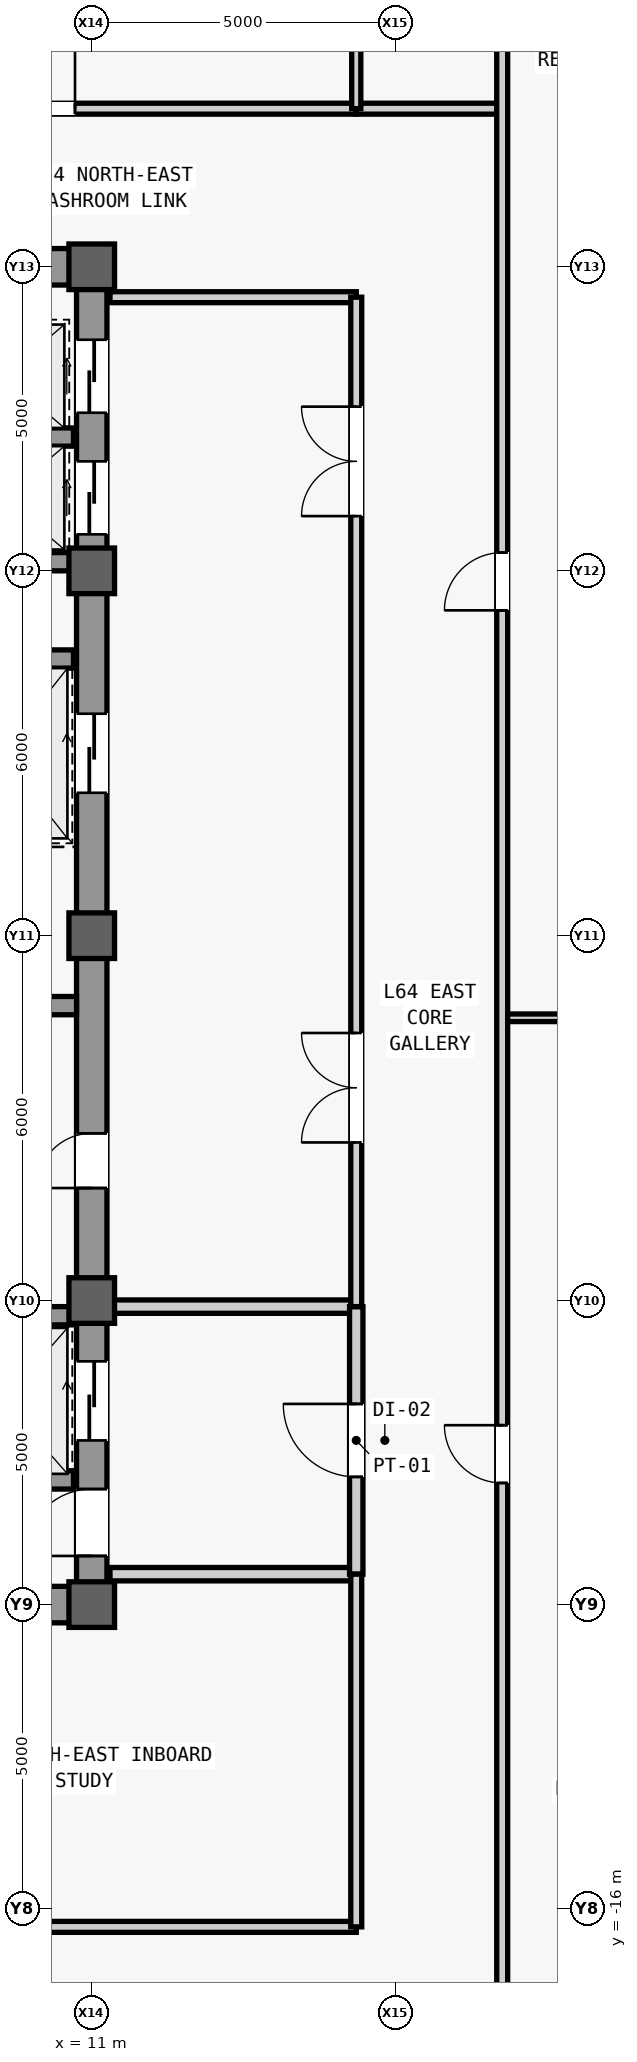
"""IFC4 building model, lengths in metres.
Left out: names, types, materials, properties, quantities, classifications, styles, units other than length and angle.
Written with IfcOpenShell. Run it as: python <this file> out.ifc"""

import sys

from ifc_helpers import new_model, si_unit, direction, frame, frame_2d, origin, origin_2d, place, context, subcontext, project, spatial, rectangle, extrude, source, transform, mapped, element, fill, save


model = new_model("IFC4")
c1 = context("Model", 3, precision=1e-05, world=origin(), true_north=direction((0.0, 1.0)))
c2 = subcontext(c1, "Body", "Model", "MODEL_VIEW")
j1 = project(units=[si_unit("LENGTHUNIT", "METRE"), si_unit("PLANEANGLEUNIT", "RADIAN")], contexts=[c1])
p1 = place(None, origin())
s1 = spatial("IfcSite", under=j1, at=p1, CompositionType="ELEMENT")
p2 = place(p1, origin())
s2 = spatial("IfcBuilding", under=s1, at=p2, CompositionType="ELEMENT")
p3 = place(p2, frame((0.0, 0.0, 273.5)))
s3 = spatial("IfcBuildingStorey", under=s2, at=p3, CompositionType="ELEMENT", Elevation=273.5)
m1 = source(origin(), c2, "Body", "SweptSolid", [
    extrude(rectangle(XDim=22.0, YDim=0.5, at=frame_2d((11.0, 0.0))), origin(), (0.0, 0.0, 1.0), 3.78),
])
p4 = place(p3, frame((11.0, -11.0, 0.0), z_axis=(0.0, 0.0, 1.0), x_axis=(0.0, 1.0, 0.0)))
e1 = element("IfcWall", 1, at=p4, inside=s3, PredefinedType="SHEAR", context=c2, shape_type="MappedRepresentation", body=[
    mapped(m1, transform((0.0, 0.0, 0.0), scale=1.0)),
])
m2 = source(origin(), c2, "Body", "SweptSolid", [
    extrude(rectangle(XDim=1.1, YDim=2.2, at=frame_2d((0.55, 1.1))), frame((0.0, 0.26, 0.0), z_axis=(0.0, -1.0, 0.0), x_axis=(1.0, 0.0, 0.0)), (0.0, 0.0, 1.0), 0.52),
])
p5 = place(p4, frame((0.8, 0.0, 0.0)))
e2 = element("IfcOpeningElement", 2, at=p5, cuts=e1, PredefinedType="OPENING", context=c2, shape_type="MappedRepresentation", body=[
    mapped(m2, transform((0.0, 0.0, 0.0), scale=1.0)),
])
m3 = source(origin(), c2, "Body", "SweptSolid", [
    extrude(rectangle(XDim=0.9, YDim=2.15, at=frame_2d((0.45, 1.075))), frame((0.0, 0.26, 0.0), z_axis=(0.0, -1.0, 0.0), x_axis=(1.0, 0.0, 0.0)), (0.0, 0.0, 1.0), 0.52),
])
p6 = place(p4, frame((6.85, 0.0, 0.0)))
e3 = element("IfcOpeningElement", 3, at=p6, cuts=e1, PredefinedType="OPENING", context=c2, shape_type="MappedRepresentation", body=[
    mapped(m3, transform((0.0, 0.0, 0.0), scale=1.0)),
])
m4 = source(origin(), c2, "Body", "SweptSolid", [
    extrude(rectangle(XDim=1.2, YDim=2.3, at=frame_2d((0.6, 1.15))), frame((0.0, 0.26, 0.0), z_axis=(0.0, -1.0, 0.0), x_axis=(1.0, 0.0, 0.0)), (0.0, 0.0, 1.0), 0.52),
])
p7 = place(p4, frame((17.6, 0.0, 0.0)))
e4 = element("IfcOpeningElement", 4, at=p7, cuts=e1, PredefinedType="OPENING", context=c2, shape_type="MappedRepresentation", body=[
    mapped(m4, transform((0.0, 0.0, 0.0), scale=1.0)),
])
p8 = place(p4, frame((19.6, 0.0, 0.0)))
e5 = element("IfcOpeningElement", 5, at=p8, cuts=e1, PredefinedType="OPENING", context=c2, shape_type="MappedRepresentation", body=[
    mapped(m4, transform((0.0, 0.0, 0.0), scale=1.0)),
])
m5 = source(origin(), c2, "Body", "SweptSolid", [
    extrude(rectangle(XDim=1.3, YDim=2.3, at=frame_2d((0.65, 1.15))), frame((0.0, 0.26, 0.0), z_axis=(0.0, -1.0, 0.0), x_axis=(1.0, 0.0, 0.0)), (0.0, 0.0, 1.0), 0.52),
])
p9 = place(p4, frame((2.7, 0.0, 0.0)))
e6 = element("IfcOpeningElement", 6, at=p9, cuts=e1, PredefinedType="OPENING", context=c2, shape_type="MappedRepresentation", body=[
    mapped(m5, transform((0.0, 0.0, 0.0), scale=1.0)),
])
p10 = place(p4, frame((13.35, 0.0, 0.0)))
e7 = element("IfcOpeningElement", 7, at=p10, cuts=e1, PredefinedType="OPENING", context=c2, shape_type="MappedRepresentation", body=[
    mapped(m5, transform((0.0, 0.0, 0.0), scale=1.0)),
])
m6 = source(origin(), c2, "Body", "SweptSolid", [
    extrude(rectangle(XDim=5.9, YDim=0.6, at=frame_2d((2.95, 0.0))), origin(), (0.0, 0.0, 1.0), 3.78),
])
p11 = place(p3, frame((4.85, -11.0, 0.0), z_axis=(0.0, 0.0, 1.0), x_axis=(1.0, 0.0, 0.0)))
e8 = element("IfcWall", 8, at=p11, inside=s3, PredefinedType="SHEAR", context=c2, shape_type="MappedRepresentation", body=[
    mapped(m6, transform((0.0, 0.0, 0.0), scale=1.0)),
])
p12 = place(p3, frame((4.85, 11.0, 0.0), z_axis=(0.0, 0.0, 1.0), x_axis=(1.0, 0.0, 0.0)))
e9 = element("IfcWall", 9, at=p12, inside=s3, PredefinedType="SHEAR", context=c2, shape_type="MappedRepresentation", body=[
    mapped(m6, transform((0.0, 0.0, 0.0), scale=1.0)),
])
m7 = source(origin(), c2, "Body", "SweptSolid", [
    extrude(rectangle(XDim=1.05, YDim=2.2, at=frame_2d((0.525, 1.1))), frame((0.0, 0.31, 0.0), z_axis=(0.0, -1.0, 0.0), x_axis=(1.0, 0.0, 0.0)), (0.0, 0.0, 1.0), 0.62),
])
p13 = place(p12, frame((1.375, 0.0, 0.0)))
e10 = element("IfcOpeningElement", 10, at=p13, cuts=e9, PredefinedType="OPENING", context=c2, shape_type="MappedRepresentation", body=[
    mapped(m7, transform((0.0, 0.0, 0.0), scale=1.0)),
])
m8 = source(origin(), c2, "Body", "SweptSolid", [
    extrude(rectangle(XDim=5.65, YDim=0.3, at=frame_2d((2.825, 0.0))), origin(), (0.0, 0.0, 1.0), 3.78),
])
p14 = place(p3, frame((5.1, -1.15, 0.0), z_axis=(0.0, 0.0, 1.0), x_axis=(1.0, 0.0, 0.0)))
e11 = element("IfcWall", 11, at=p14, inside=s3, PredefinedType="SHEAR", context=c2, shape_type="MappedRepresentation", body=[
    mapped(m8, transform((0.0, 0.0, 0.0), scale=1.0)),
])
m9 = source(origin(), c2, "Body", "SweptSolid", [
    extrude(rectangle(XDim=0.75, YDim=0.75, at=origin_2d()), origin(), (0.0, 0.0, 1.0), 4.0),
])
for number, where, z_axis, x_axis in (
    (12, (11.0, -11.0, 0.0), (0.0, 0.0, 1.0), (1.0, 0.0, 0.0)),
    (13, (11.0, -6.0, 0.0), (0.0, 0.0, 1.0), (1.0, 0.0, 0.0)),
    (14, (11.0, 0.0, 0.0), (0.0, 0.0, 1.0), (1.0, 0.0, 0.0)),
    (15, (11.0, 6.0, 0.0), (0.0, 0.0, 1.0), (1.0, 0.0, 0.0)),
    (16, (11.0, 11.0, 0.0), (0.0, 0.0, 1.0), (1.0, 0.0, 0.0)),
):
    element("IfcColumn", number, at=place(p3, frame(where, z_axis=z_axis, x_axis=x_axis)), inside=s3, PredefinedType="COLUMN", context=c2, shape_type="MappedRepresentation", body=[
        mapped(m9, transform((0.0, 0.0, 0.0), scale=1.0)),
    ])
m10 = source(origin(), c2, "Body", "SweptSolid", [
    extrude(rectangle(XDim=2.2, YDim=0.3, at=frame_2d((1.1, 0.0))), origin(), (0.0, 0.0, 1.0), 3.78),
])
for number, where, z_axis, x_axis in (
    (17, (8.5, -8.95, 0.0), (0.0, 0.0, 1.0), (1.0, 0.0, 0.0)),
    (18, (8.5, -6.25, 0.0), (0.0, 0.0, 1.0), (1.0, 0.0, 0.0)),
):
    element("IfcWall", number, at=place(p3, frame(where, z_axis=z_axis, x_axis=x_axis)), inside=s3, PredefinedType="SHEAR", context=c2, shape_type="MappedRepresentation", body=[
        mapped(m10, transform((0.0, 0.0, 0.0), scale=1.0)),
    ])
m11 = source(origin(), c2, "Body", "SweptSolid", [
    extrude(rectangle(XDim=2.3, YDim=0.3, at=frame_2d((1.15, 0.0))), origin(), (0.0, 0.0, 1.0), 3.78),
])
for number, where, z_axis, x_axis in (
    (19, (8.4, 4.55, 0.0), (0.0, 0.0, 1.0), (1.0, 0.0, 0.0)),
    (20, (8.4, 6.15, 0.0), (0.0, 0.0, 1.0), (1.0, 0.0, 0.0)),
    (21, (8.4, 8.2, 0.0), (0.0, 0.0, 1.0), (1.0, 0.0, 0.0)),
):
    element("IfcWall", number, at=place(p3, frame(where, z_axis=z_axis, x_axis=x_axis)), inside=s3, PredefinedType="SHEAR", context=c2, shape_type="MappedRepresentation", body=[
        mapped(m11, transform((0.0, 0.0, 0.0), scale=1.0)),
    ])
m12 = source(origin(), c2, "Body", "SweptSolid", [
    extrude(rectangle(XDim=4.05, YDim=0.22, at=frame_2d((2.025, 0.0))), origin(), (0.0, 0.0, 1.0), 3.78),
])
p15 = place(p3, frame((11.3, -10.5, 0.0), z_axis=(0.0, 0.0, 1.0), x_axis=(1.0, 0.0, 0.0)))
e22 = element("IfcWall", 22, at=p15, inside=s3, PredefinedType="PARTITIONING", context=c2, shape_type="MappedRepresentation", body=[
    mapped(m12, transform((0.0, 0.0, 0.0), scale=1.0)),
])
m13 = source(origin(), c2, "Body", "SweptSolid", [
    extrude(rectangle(XDim=4.05, YDim=0.22, at=frame_2d((2.025, 0.0))), origin(), (0.0, 0.0, 1.0), 3.085),
])
p16 = place(p3, frame((11.3, -6.1, 0.0), z_axis=(0.0, 0.0, 1.0), x_axis=(1.0, 0.0, 0.0)))
e23 = element("IfcWall", 23, at=p16, inside=s3, PredefinedType="PARTITIONING", context=c2, shape_type="MappedRepresentation", body=[
    mapped(m13, transform((0.0, 0.0, 0.0), scale=1.0)),
])
m14 = source(origin(), c2, "Body", "SweptSolid", [
    extrude(rectangle(XDim=4.4, YDim=0.22, at=frame_2d((2.2, 0.0))), origin(), (0.0, 0.0, 1.0), 3.78),
])
p17 = place(p3, frame((15.35, -10.5, 0.0), z_axis=(0.0, 0.0, 1.0), x_axis=(0.0, 1.0, 0.0)))
e24 = element("IfcWall", 24, at=p17, inside=s3, PredefinedType="PARTITIONING", context=c2, shape_type="MappedRepresentation", body=[
    mapped(m14, transform((0.0, 0.0, 0.0), scale=1.0)),
])
m15 = source(origin(), c2, "Body", "SweptSolid", [
    extrude(rectangle(XDim=1.2, YDim=2.2, at=frame_2d((0.6, 1.1))), frame((0.0, 0.12, 0.0), z_axis=(0.0, -1.0, 0.0), x_axis=(1.0, 0.0, 0.0)), (0.0, 0.0, 1.0), 0.24),
])
p18 = place(p17, frame((1.6, 0.0, 0.0)))
e25 = element("IfcOpeningElement", 25, at=p18, cuts=e24, PredefinedType="OPENING", context=c2, shape_type="MappedRepresentation", body=[
    mapped(m15, transform((0.0, 0.0, 0.0), scale=1.0)),
])
m16 = source(origin(), c2, "Body", "SweptSolid", [
    extrude(rectangle(XDim=4.05, YDim=0.18, at=frame_2d((2.025, 0.0))), origin(), (0.0, 0.0, 1.0), 3.78),
])
p19 = place(p3, frame((11.3, 10.5, 0.0), z_axis=(0.0, 0.0, 1.0), x_axis=(1.0, 0.0, 0.0)))
e26 = element("IfcWall", 26, at=p19, inside=s3, PredefinedType="PARTITIONING", context=c2, shape_type="MappedRepresentation", body=[
    mapped(m16, transform((0.0, 0.0, 0.0), scale=1.0)),
])
m17 = source(origin(), c2, "Body", "SweptSolid", [
    extrude(rectangle(XDim=16.6, YDim=0.18, at=frame_2d((8.3, 0.0))), origin(), (0.0, 0.0, 1.0), 3.78),
])
p20 = place(p3, frame((15.35, -6.1, 0.0), z_axis=(0.0, 0.0, 1.0), x_axis=(0.0, 1.0, 0.0)))
e27 = element("IfcWall", 27, at=p20, inside=s3, PredefinedType="PARTITIONING", context=c2, shape_type="MappedRepresentation", body=[
    mapped(m17, transform((0.0, 0.0, 0.0), scale=1.0)),
])
m18 = source(origin(), c2, "Body", "SweptSolid", [
    extrude(rectangle(XDim=1.8, YDim=2.25, at=frame_2d((0.9, 1.125))), frame((0.0, 0.1, 0.0), z_axis=(0.0, -1.0, 0.0), x_axis=(1.0, 0.0, 0.0)), (0.0, 0.0, 1.0), 0.2),
])
p21 = place(p20, frame((2.7, 0.0, 0.0)))
e28 = element("IfcOpeningElement", 28, at=p21, cuts=e27, PredefinedType="OPENING", context=c2, shape_type="MappedRepresentation", body=[
    mapped(m18, transform((0.0, 0.0, 0.0), scale=1.0)),
])
p22 = place(p20, frame((13.0, 0.0, 0.0)))
e29 = element("IfcOpeningElement", 29, at=p22, cuts=e27, PredefinedType="OPENING", context=c2, shape_type="MappedRepresentation", body=[
    mapped(m18, transform((0.0, 0.0, 0.0), scale=1.0)),
])
m19 = source(origin(), c2, "Body", "SweptSolid", [
    extrude(rectangle(XDim=14.05, YDim=0.18, at=frame_2d((7.025, 0.0))), origin(), (0.0, 0.0, 1.0), 3.78),
])
p23 = place(p3, frame((1.3, -16.3, 0.0), z_axis=(0.0, 0.0, 1.0), x_axis=(1.0, 0.0, 0.0)))
e30 = element("IfcWall", 30, at=p23, inside=s3, PredefinedType="PARTITIONING", context=c2, shape_type="MappedRepresentation", body=[
    mapped(m19, transform((0.0, 0.0, 0.0), scale=1.0)),
])
m20 = source(origin(), c2, "Body", "SweptSolid", [
    extrude(rectangle(XDim=0.9, YDim=2.15, at=frame_2d((0.45, 1.075))), frame((0.0, 0.1, 0.0), z_axis=(0.0, -1.0, 0.0), x_axis=(1.0, 0.0, 0.0)), (0.0, 0.0, 1.0), 0.2),
])
p24 = place(p23, frame((6.25, 0.0, 0.0)))
e31 = element("IfcOpeningElement", 31, at=p24, cuts=e30, PredefinedType="OPENING", context=c2, shape_type="MappedRepresentation", body=[
    mapped(m20, transform((0.0, 0.0, 0.0), scale=1.0)),
])
m21 = source(origin(), c2, "Body", "SweptSolid", [
    extrude(rectangle(XDim=5.8, YDim=0.18, at=frame_2d((2.9, 0.0))), origin(), (0.0, 0.0, 1.0), 3.78),
])
p25 = place(p3, frame((15.35, -16.3, 0.0), z_axis=(0.0, 0.0, 1.0), x_axis=(0.0, 1.0, 0.0)))
e32 = element("IfcWall", 32, at=p25, inside=s3, PredefinedType="PARTITIONING", context=c2, shape_type="MappedRepresentation", body=[
    mapped(m21, transform((0.0, 0.0, 0.0), scale=1.0)),
])
m22 = source(origin(), c2, "Body", "SweptSolid", [
    extrude(rectangle(XDim=2.4, YDim=0.18, at=frame_2d((1.2, 0.0))), origin(), (0.0, 0.0, 1.0), 3.78),
])
p26 = place(p3, frame((15.35, 13.6, 0.0), z_axis=(0.0, 0.0, 1.0), x_axis=(1.0, 0.0, 0.0)))
e33 = element("IfcWall", 33, at=p26, inside=s3, PredefinedType="PARTITIONING", context=c2, shape_type="MappedRepresentation", body=[
    mapped(m22, transform((0.0, 0.0, 0.0), scale=1.0)),
])
m23 = source(origin(), c2, "Body", "SweptSolid", [
    extrude(rectangle(XDim=32.75, YDim=0.18, at=frame_2d((16.375, 0.0))), origin(), (0.0, 0.0, 1.0), 3.78),
])
p27 = place(p3, frame((-17.4, 13.6, 0.0), z_axis=(0.0, 0.0, 1.0), x_axis=(1.0, 0.0, 0.0)))
e34 = element("IfcWall", 34, at=p27, inside=s3, PredefinedType="PARTITIONING", context=c2, shape_type="MappedRepresentation", body=[
    mapped(m23, transform((0.0, 0.0, 0.0), scale=1.0)),
])
m24 = source(origin(), c2, "Body", "SweptSolid", [
    extrude(rectangle(XDim=1.05, YDim=2.2, at=frame_2d((0.525, 1.1))), frame((0.0, 0.1, 0.0), z_axis=(0.0, -1.0, 0.0), x_axis=(1.0, 0.0, 0.0)), (0.0, 0.0, 1.0), 0.2),
])
p28 = place(p27, frame((27.075, 0.0, 0.0)))
e35 = element("IfcOpeningElement", 35, at=p28, cuts=e34, PredefinedType="OPENING", context=c2, shape_type="MappedRepresentation", body=[
    mapped(m24, transform((0.0, 0.0, 0.0), scale=1.0)),
])
m25 = source(origin(), c2, "Body", "SweptSolid", [
    extrude(rectangle(XDim=14.4, YDim=0.15, at=frame_2d((7.2, 0.0))), origin(), (0.0, 0.0, 1.0), 3.78),
])
p29 = place(p3, frame((15.35, 13.6, 0.0), z_axis=(0.0, 0.0, 1.0), x_axis=(0.0, 1.0, 0.0)))
e36 = element("IfcWall", 36, at=p29, inside=s3, PredefinedType="PARTITIONING", context=c2, shape_type="MappedRepresentation", body=[
    mapped(m25, transform((0.0, 0.0, 0.0), scale=1.0)),
])
m26 = source(origin(), c2, "Body", "SweptSolid", [
    extrude(rectangle(XDim=10.25, YDim=0.125, at=frame_2d((5.125, 0.0))), origin(), (0.0, 0.0, 1.0), 3.78),
])
p30 = place(p3, frame((17.75, -1.35, 0.0), z_axis=(0.0, 0.0, 1.0), x_axis=(1.0, 0.0, 0.0)))
e37 = element("IfcWall", 37, at=p30, inside=s3, PredefinedType="PARTITIONING", context=c2, shape_type="MappedRepresentation", body=[
    mapped(m26, transform((0.0, 0.0, 0.0), scale=1.0)),
])
m27 = source(origin(), c2, "Body", "SweptSolid", [
    extrude(rectangle(XDim=41.2, YDim=0.18, at=frame_2d((20.6, 0.0))), origin(), (0.0, 0.0, 1.0), 3.78),
])
p31 = place(p3, frame((17.75, -18.7, 0.0), z_axis=(0.0, 0.0, 1.0), x_axis=(0.0, 1.0, 0.0)))
e38 = element("IfcWall", 38, at=p31, inside=s3, PredefinedType="PARTITIONING", context=c2, shape_type="MappedRepresentation", body=[
    mapped(m27, transform((0.0, 0.0, 0.0), scale=1.0)),
])
m28 = source(origin(), c2, "Body", "SweptSolid", [
    extrude(rectangle(XDim=0.95, YDim=2.15, at=frame_2d((0.475, 1.075))), frame((0.0, 0.1, 0.0), z_axis=(0.0, -1.0, 0.0), x_axis=(1.0, 0.0, 0.0)), (0.0, 0.0, 1.0), 0.2),
])
p32 = place(p31, frame((9.7, 0.0, 0.0)))
e39 = element("IfcOpeningElement", 39, at=p32, cuts=e38, PredefinedType="OPENING", context=c2, shape_type="MappedRepresentation", body=[
    mapped(m28, transform((0.0, 0.0, 0.0), scale=1.0)),
])
p33 = place(p31, frame((24.05, 0.0, 0.0)))
e40 = element("IfcOpeningElement", 40, at=p33, cuts=e38, PredefinedType="OPENING", context=c2, shape_type="MappedRepresentation", body=[
    mapped(m28, transform((0.0, 0.0, 0.0), scale=1.0)),
])
m29 = source(origin(), c2, "Body", "SweptSolid", [
    extrude(rectangle(XDim=1.1, YDim=2.2, at=frame_2d((0.55, 1.1))), frame((0.0, 0.025, 0.0), z_axis=(0.0, -1.0, 0.0), x_axis=(1.0, 0.0, 0.0)), (0.0, 0.0, 1.0), 0.05),
])
p34 = place(p5, origin())
e41 = element("IfcDoor", 41, at=p34, inside=s3, OperationType="SINGLE_SWING_LEFT", PredefinedType="DOOR", context=c2, shape_type="MappedRepresentation", body=[
    mapped(m29, transform((0.0, 0.0, 0.0), scale=1.0)),
])
fill(e2, e41)
m30 = source(origin(), c2, "Body", "SweptSolid", [
    extrude(rectangle(XDim=0.9, YDim=2.15, at=frame_2d((0.45, 1.075))), frame((0.0, 0.025, 0.0), z_axis=(0.0, -1.0, 0.0), x_axis=(1.0, 0.0, 0.0)), (0.0, 0.0, 1.0), 0.05),
])
p35 = place(p6, origin())
e42 = element("IfcDoor", 42, at=p35, inside=s3, OperationType="SINGLE_SWING_LEFT", PredefinedType="DOOR", context=c2, shape_type="MappedRepresentation", body=[
    mapped(m30, transform((0.0, 0.0, 0.0), scale=1.0)),
])
fill(e3, e42)
m31 = source(origin(), c2, "Body", "SweptSolid", [
    extrude(rectangle(XDim=1.2, YDim=2.2, at=frame_2d((0.6, 1.1))), frame((0.0, 0.025, 0.0), z_axis=(0.0, -1.0, 0.0), x_axis=(1.0, 0.0, 0.0)), (0.0, 0.0, 1.0), 0.05),
])
p36 = place(p18, origin())
e43 = element("IfcDoor", 43, at=p36, inside=s3, OperationType="SINGLE_SWING_RIGHT", PredefinedType="DOOR", context=c2, shape_type="MappedRepresentation", body=[
    mapped(m31, transform((0.0, 0.0, 0.0), scale=1.0)),
])
fill(e25, e43)
m32 = source(origin(), c2, "Body", "SweptSolid", [
    extrude(rectangle(XDim=1.8, YDim=2.25, at=frame_2d((0.9, 1.125))), frame((0.0, 0.025, 0.0), z_axis=(0.0, -1.0, 0.0), x_axis=(1.0, 0.0, 0.0)), (0.0, 0.0, 1.0), 0.05),
])
p37 = place(p21, origin())
e44 = element("IfcDoor", 44, at=p37, inside=s3, OperationType="SINGLE_SWING_RIGHT", PredefinedType="DOOR", context=c2, shape_type="MappedRepresentation", body=[
    mapped(m32, transform((0.0, 0.0, 0.0), scale=1.0)),
])
fill(e28, e44)
p38 = place(p22, origin())
e45 = element("IfcDoor", 45, at=p38, inside=s3, OperationType="SINGLE_SWING_LEFT", PredefinedType="DOOR", context=c2, shape_type="MappedRepresentation", body=[
    mapped(m32, transform((0.0, 0.0, 0.0), scale=1.0)),
])
fill(e29, e45)
m33 = source(origin(), c2, "Body", "SweptSolid", [
    extrude(rectangle(XDim=1.05, YDim=2.2, at=frame_2d((0.525, 1.1))), frame((0.0, 0.025, 0.0), z_axis=(0.0, -1.0, 0.0), x_axis=(1.0, 0.0, 0.0)), (0.0, 0.0, 1.0), 0.05),
])
p39 = place(p28, origin())
e46 = element("IfcDoor", 46, at=p39, inside=s3, OperationType="SINGLE_SWING_RIGHT", PredefinedType="DOOR", context=c2, shape_type="MappedRepresentation", body=[
    mapped(m33, transform((0.0, 0.0, 0.0), scale=1.0)),
])
fill(e35, e46)
m34 = source(origin(), c2, "Body", "SweptSolid", [
    extrude(rectangle(XDim=0.95, YDim=2.15, at=frame_2d((0.475, 1.075))), frame((0.0, 0.025, 0.0), z_axis=(0.0, -1.0, 0.0), x_axis=(1.0, 0.0, 0.0)), (0.0, 0.0, 1.0), 0.05),
])
p40 = place(p32, origin())
e47 = element("IfcDoor", 47, at=p40, inside=s3, OperationType="SINGLE_SWING_RIGHT", PredefinedType="DOOR", context=c2, shape_type="MappedRepresentation", body=[
    mapped(m34, transform((0.0, 0.0, 0.0), scale=1.0)),
])
fill(e39, e47)
p41 = place(p33, origin())
e48 = element("IfcDoor", 48, at=p41, inside=s3, OperationType="SINGLE_SWING_LEFT", PredefinedType="DOOR", context=c2, shape_type="MappedRepresentation", body=[
    mapped(m34, transform((0.0, 0.0, 0.0), scale=1.0)),
])
fill(e40, e48)
m35 = source(origin(), c2, "Body", "SweptSolid", [
    extrude(rectangle(XDim=1.2, YDim=2.3, at=frame_2d((0.6, 1.15))), frame((0.0, 0.025, 0.0), z_axis=(0.0, -1.0, 0.0), x_axis=(1.0, 0.0, 0.0)), (0.0, 0.0, 1.0), 0.05),
])
p42 = place(p7, origin())
e49 = element("IfcDoor", 49, at=p42, inside=s3, OperationType="SLIDING_TO_LEFT", PredefinedType="DOOR", context=c2, shape_type="MappedRepresentation", body=[
    mapped(m35, transform((0.0, 0.0, 0.0), scale=1.0)),
])
fill(e4, e49)
p43 = place(p8, origin())
e50 = element("IfcDoor", 50, at=p43, inside=s3, OperationType="SLIDING_TO_LEFT", PredefinedType="DOOR", context=c2, shape_type="MappedRepresentation", body=[
    mapped(m35, transform((0.0, 0.0, 0.0), scale=1.0)),
])
fill(e5, e50)
m36 = source(origin(), c2, "Body", "SweptSolid", [
    extrude(rectangle(XDim=1.3, YDim=2.3, at=frame_2d((0.65, 1.15))), frame((0.0, 0.025, 0.0), z_axis=(0.0, -1.0, 0.0), x_axis=(1.0, 0.0, 0.0)), (0.0, 0.0, 1.0), 0.05),
])
p44 = place(p9, origin())
e51 = element("IfcDoor", 51, at=p44, inside=s3, OperationType="SLIDING_TO_LEFT", PredefinedType="DOOR", context=c2, shape_type="MappedRepresentation", body=[
    mapped(m36, transform((0.0, 0.0, 0.0), scale=1.0)),
])
fill(e6, e51)
p45 = place(p10, origin())
e52 = element("IfcDoor", 52, at=p45, inside=s3, OperationType="SLIDING_TO_LEFT", PredefinedType="DOOR", context=c2, shape_type="MappedRepresentation", body=[
    mapped(m36, transform((0.0, 0.0, 0.0), scale=1.0)),
])
fill(e7, e52)
save(model, sys.argv[1])
